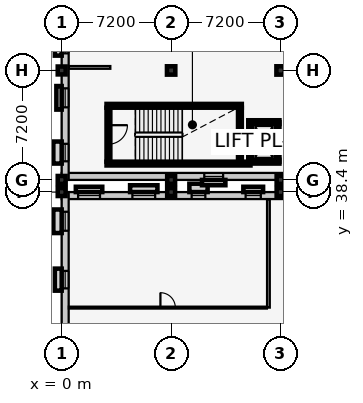
"""IFC4 building model, lengths in metres.
Left out: names, types, materials, properties, quantities, classifications, styles, units other than length and angle.
Written with IfcOpenShell. Run it as: python <this file> out.ifc"""

import sys

from ifc_helpers import new_model, si_unit, direction, frame, frame_2d, origin, origin_2d, place, context, subcontext, project, spatial, rectangle, extrude, element, fill, save


model = new_model("IFC4")
c1 = context("Model", 3, precision=1e-05, world=origin(), true_north=direction((0.0, 1.0)))
c2 = subcontext(c1, "Body", "Model", "MODEL_VIEW")
j1 = project(units=[si_unit("LENGTHUNIT", "METRE"), si_unit("PLANEANGLEUNIT", "RADIAN")], contexts=[c1])
p1 = place(None, origin())
s1 = spatial("IfcSite", under=j1, at=p1, CompositionType="ELEMENT")
p2 = place(p1, origin())
s2 = spatial("IfcBuilding", under=s1, at=p2, CompositionType="ELEMENT")
p3 = place(p2, frame((0.0, 0.0, 5.4)))
s3 = spatial("IfcBuildingStorey", under=s2, at=p3, CompositionType="ELEMENT", Elevation=5.4)
for number, where, z_axis, x_axis in (
    (1, (0.0, 38.4, 0.0), (0.0, 0.0, 1.0), (1.0, 0.0, 0.0)),
    (2, (7.2, 38.4, 0.0), (0.0, 0.0, 1.0), (1.0, 0.0, 0.0)),
    (3, (14.4, 38.4, 0.0), (0.0, 0.0, 1.0), (1.0, 0.0, 0.0)),
    (4, (0.0, 39.2, 0.0), (0.0, 0.0, 1.0), (1.0, 0.0, 0.0)),
    (5, (0.0, 46.4, 0.0), (0.0, 0.0, 1.0), (1.0, 0.0, 0.0)),
    (6, (7.2, 39.2, 0.0), (0.0, 0.0, 1.0), (1.0, 0.0, 0.0)),
):
    element("IfcColumn", number, at=place(p3, frame(where, z_axis=z_axis, x_axis=x_axis)), inside=s3, PredefinedType="COLUMN", context=c2, shape_type="SweptSolid", body=[
        extrude(rectangle(XDim=0.52, YDim=0.52, at=origin_2d()), origin(), (0.0, 0.0, 1.0), 4.2),
    ])
p4 = place(p3, frame((7.2, 46.4, 0.0), z_axis=(0.0, 0.0, 1.0), x_axis=(1.0, 0.0, 0.0)))
e7 = element("IfcColumn", 7, at=p4, inside=s3, PredefinedType="COLUMN", context=c2, shape_type="SweptSolid", body=[
    extrude(rectangle(XDim=0.55, YDim=0.55, at=origin_2d()), origin(), (0.0, 0.0, 1.0), 4.2),
])
p5 = place(p3, frame((14.4, 39.2, 0.0), z_axis=(0.0, 0.0, 1.0), x_axis=(1.0, 0.0, 0.0)))
e8 = element("IfcColumn", 8, at=p5, inside=s3, PredefinedType="COLUMN", context=c2, shape_type="SweptSolid", body=[
    extrude(rectangle(XDim=0.52, YDim=0.52, at=origin_2d()), origin(), (0.0, 0.0, 1.0), 4.2),
])
p6 = place(p3, frame((14.4, 46.4, 0.0), z_axis=(0.0, 0.0, 1.0), x_axis=(1.0, 0.0, 0.0)))
e9 = element("IfcColumn", 9, at=p6, inside=s3, PredefinedType="COLUMN", context=c2, shape_type="SweptSolid", body=[
    extrude(rectangle(XDim=0.55, YDim=0.55, at=origin_2d()), origin(), (0.0, 0.0, 1.0), 4.2),
])
p7 = place(p3, frame((0.0, 38.17, 0.0), z_axis=(0.0, 0.0, 1.0), x_axis=(1.0, 0.0, 0.0)))
e10 = element("IfcWall", 10, at=p7, inside=s3, PredefinedType="SOLIDWALL", context=c2, shape_type="SweptSolid", body=[
    extrude(rectangle(XDim=57.6, YDim=0.46, at=frame_2d((28.8, 0.0))), origin(), (0.0, 0.0, 1.0), 3.215),
])
p8 = place(p7, frame((1.08, 0.0, 0.9)))
e11 = element("IfcOpeningElement", 11, at=p8, cuts=e10, PredefinedType="OPENING", context=c2, shape_type="SweptSolid", body=[
    extrude(rectangle(XDim=1.44, YDim=1.75, at=frame_2d((0.72, 0.875))), frame((0.0, 0.242, 0.0), z_axis=(0.0, -1.0, 0.0), x_axis=(1.0, 0.0, 0.0)), (0.0, 0.0, 1.0), 0.484),
])
p9 = place(p7, frame((4.65, 0.0, 0.9)))
e12 = element("IfcOpeningElement", 12, at=p9, cuts=e10, PredefinedType="OPENING", context=c2, shape_type="SweptSolid", body=[
    extrude(rectangle(XDim=1.5, YDim=1.75, at=frame_2d((0.75, 0.875))), frame((0.0, 0.242, 0.0), z_axis=(0.0, -1.0, 0.0), x_axis=(1.0, 0.0, 0.0)), (0.0, 0.0, 1.0), 0.484),
])
p10 = place(p7, frame((8.55, 0.0, 0.9)))
e13 = element("IfcOpeningElement", 13, at=p10, cuts=e10, PredefinedType="OPENING", context=c2, shape_type="SweptSolid", body=[
    extrude(rectangle(XDim=0.9, YDim=1.35, at=frame_2d((0.45, 0.675))), frame((0.0, 0.242, 0.0), z_axis=(0.0, -1.0, 0.0), x_axis=(1.0, 0.0, 0.0)), (0.0, 0.0, 1.0), 0.484),
])
p11 = place(p7, frame((12.1, 0.0, 0.9)))
e14 = element("IfcOpeningElement", 14, at=p11, cuts=e10, PredefinedType="OPENING", context=c2, shape_type="SweptSolid", body=[
    extrude(rectangle(XDim=1.0, YDim=1.35, at=frame_2d((0.5, 0.675))), frame((0.0, 0.242, 0.0), z_axis=(0.0, -1.0, 0.0), x_axis=(1.0, 0.0, 0.0)), (0.0, 0.0, 1.0), 0.484),
])
p12 = place(p7, frame((15.65, 0.0, 0.9)))
e15 = element("IfcOpeningElement", 15, at=p12, cuts=e10, PredefinedType="OPENING", context=c2, shape_type="SweptSolid", body=[
    extrude(rectangle(XDim=1.1, YDim=1.35, at=frame_2d((0.55, 0.675))), frame((0.0, 0.242, 0.0), z_axis=(0.0, -1.0, 0.0), x_axis=(1.0, 0.0, 0.0)), (0.0, 0.0, 1.0), 0.484),
])
p13 = place(p7, frame((19.2, 0.0, 0.9)))
e16 = element("IfcOpeningElement", 16, at=p13, cuts=e10, PredefinedType="OPENING", context=c2, shape_type="SweptSolid", body=[
    extrude(rectangle(XDim=1.2, YDim=1.35, at=frame_2d((0.6, 0.675))), frame((0.0, 0.242, 0.0), z_axis=(0.0, -1.0, 0.0), x_axis=(1.0, 0.0, 0.0)), (0.0, 0.0, 1.0), 0.484),
])
p14 = place(p7, frame((22.75, 0.0, 0.9)))
e17 = element("IfcOpeningElement", 17, at=p14, cuts=e10, PredefinedType="OPENING", context=c2, shape_type="SweptSolid", body=[
    extrude(rectangle(XDim=1.3, YDim=1.35, at=frame_2d((0.65, 0.675))), frame((0.0, 0.242, 0.0), z_axis=(0.0, -1.0, 0.0), x_axis=(1.0, 0.0, 0.0)), (0.0, 0.0, 1.0), 0.484),
])
p15 = place(p7, frame((30.125, 0.0, 0.9)))
e18 = element("IfcOpeningElement", 18, at=p15, cuts=e10, PredefinedType="OPENING", context=c2, shape_type="SweptSolid", body=[
    extrude(rectangle(XDim=0.95, YDim=1.45, at=frame_2d((0.475, 0.725))), frame((0.0, 0.242, 0.0), z_axis=(0.0, -1.0, 0.0), x_axis=(1.0, 0.0, 0.0)), (0.0, 0.0, 1.0), 0.484),
])
p16 = place(p7, frame((33.675, 0.0, 0.9)))
e19 = element("IfcOpeningElement", 19, at=p16, cuts=e10, PredefinedType="OPENING", context=c2, shape_type="SweptSolid", body=[
    extrude(rectangle(XDim=1.05, YDim=1.45, at=frame_2d((0.525, 0.725))), frame((0.0, 0.242, 0.0), z_axis=(0.0, -1.0, 0.0), x_axis=(1.0, 0.0, 0.0)), (0.0, 0.0, 1.0), 0.484),
])
p17 = place(p7, frame((40.775, 0.0, 0.9)))
e20 = element("IfcOpeningElement", 20, at=p17, cuts=e10, PredefinedType="OPENING", context=c2, shape_type="SweptSolid", body=[
    extrude(rectangle(XDim=1.25, YDim=1.45, at=frame_2d((0.625, 0.725))), frame((0.0, 0.242, 0.0), z_axis=(0.0, -1.0, 0.0), x_axis=(1.0, 0.0, 0.0)), (0.0, 0.0, 1.0), 0.484),
])
p18 = place(p7, frame((44.325, 0.0, 0.9)))
e21 = element("IfcOpeningElement", 21, at=p18, cuts=e10, PredefinedType="OPENING", context=c2, shape_type="SweptSolid", body=[
    extrude(rectangle(XDim=1.35, YDim=1.45, at=frame_2d((0.675, 0.725))), frame((0.0, 0.242, 0.0), z_axis=(0.0, -1.0, 0.0), x_axis=(1.0, 0.0, 0.0)), (0.0, 0.0, 1.0), 0.484),
])
p19 = place(p7, frame((51.75, 0.0, 0.9)))
e22 = element("IfcOpeningElement", 22, at=p19, cuts=e10, PredefinedType="OPENING", context=c2, shape_type="SweptSolid", body=[
    extrude(rectangle(XDim=0.9, YDim=1.6, at=frame_2d((0.45, 0.8))), frame((0.0, 0.242, 0.0), z_axis=(0.0, -1.0, 0.0), x_axis=(1.0, 0.0, 0.0)), (0.0, 0.0, 1.0), 0.484),
])
p20 = place(p7, frame((55.275, 0.0, 0.9)))
e23 = element("IfcOpeningElement", 23, at=p20, cuts=e10, PredefinedType="OPENING", context=c2, shape_type="SweptSolid", body=[
    extrude(rectangle(XDim=1.05, YDim=1.6, at=frame_2d((0.525, 0.8))), frame((0.0, 0.242, 0.0), z_axis=(0.0, -1.0, 0.0), x_axis=(1.0, 0.0, 0.0)), (0.0, 0.0, 1.0), 0.484),
])
p21 = place(p3, frame((0.23, 0.0, 0.0), z_axis=(0.0, 0.0, 1.0), x_axis=(0.0, 1.0, 0.0)))
e24 = element("IfcWall", 24, at=p21, inside=s3, PredefinedType="SOLIDWALL", context=c2, shape_type="SweptSolid", body=[
    extrude(rectangle(XDim=38.4, YDim=0.46, at=frame_2d((19.2, 0.0))), origin(), (0.0, 0.0, 1.0), 3.075),
])
p22 = place(p21, frame((32.065, 0.0, 0.9)))
e25 = element("IfcOpeningElement", 25, at=p22, cuts=e24, PredefinedType="OPENING", context=c2, shape_type="SweptSolid", body=[
    extrude(rectangle(XDim=1.15, YDim=1.6, at=frame_2d((0.575, 0.8))), frame((0.0, 0.242, 0.0), z_axis=(0.0, -1.0, 0.0), x_axis=(1.0, 0.0, 0.0)), (0.0, 0.0, 1.0), 0.484),
])
p23 = place(p21, frame((35.855, 0.0, 0.9)))
e26 = element("IfcOpeningElement", 26, at=p23, cuts=e24, PredefinedType="OPENING", context=c2, shape_type="SweptSolid", body=[
    extrude(rectangle(XDim=1.25, YDim=1.6, at=frame_2d((0.625, 0.8))), frame((0.0, 0.242, 0.0), z_axis=(0.0, -1.0, 0.0), x_axis=(1.0, 0.0, 0.0)), (0.0, 0.0, 1.0), 0.484),
])
p24 = place(p3, frame((36.0, 39.43, 0.0), z_axis=(0.0, 0.0, 1.0), x_axis=(-1.0, 0.0, 0.0)))
e27 = element("IfcWall", 27, at=p24, inside=s3, PredefinedType="SOLIDWALL", context=c2, shape_type="SweptSolid", body=[
    extrude(rectangle(XDim=36.0, YDim=0.46, at=frame_2d((18.0, 0.0))), origin(), (0.0, 0.0, 1.0), 3.235),
])
p25 = place(p24, frame((1.425, 0.0, 0.9)))
e28 = element("IfcOpeningElement", 28, at=p25, cuts=e27, PredefinedType="OPENING", context=c2, shape_type="SweptSolid", body=[
    extrude(rectangle(XDim=1.15, YDim=1.6, at=frame_2d((0.575, 0.8))), frame((0.0, 0.242, 0.0), z_axis=(0.0, -1.0, 0.0), x_axis=(1.0, 0.0, 0.0)), (0.0, 0.0, 1.0), 0.484),
])
p26 = place(p24, frame((25.38, 0.0, 0.9)))
e29 = element("IfcOpeningElement", 29, at=p26, cuts=e27, PredefinedType="OPENING", context=c2, shape_type="SweptSolid", body=[
    extrude(rectangle(XDim=1.24, YDim=1.75, at=frame_2d((0.62, 0.875))), frame((0.0, 0.242, 0.0), z_axis=(0.0, -1.0, 0.0), x_axis=(1.0, 0.0, 0.0)), (0.0, 0.0, 1.0), 0.484),
])
p27 = place(p3, frame((0.23, 39.2, 0.0), z_axis=(0.0, 0.0, 1.0), x_axis=(0.0, 1.0, 0.0)))
e30 = element("IfcWall", 30, at=p27, inside=s3, PredefinedType="SOLIDWALL", context=c2, shape_type="SweptSolid", body=[
    extrude(rectangle(XDim=28.8, YDim=0.46, at=frame_2d((14.4, 0.0))), origin(), (0.0, 0.0, 1.0), 3.195),
])
p28 = place(p27, frame((1.225, 0.0, 0.9)))
e31 = element("IfcOpeningElement", 31, at=p28, cuts=e30, PredefinedType="OPENING", context=c2, shape_type="SweptSolid", body=[
    extrude(rectangle(XDim=1.15, YDim=1.45, at=frame_2d((0.575, 0.725))), frame((0.0, 0.242, 0.0), z_axis=(0.0, -1.0, 0.0), x_axis=(1.0, 0.0, 0.0)), (0.0, 0.0, 1.0), 0.484),
])
p29 = place(p27, frame((4.775, 0.0, 0.9)))
e32 = element("IfcOpeningElement", 32, at=p29, cuts=e30, PredefinedType="OPENING", context=c2, shape_type="SweptSolid", body=[
    extrude(rectangle(XDim=1.25, YDim=1.45, at=frame_2d((0.625, 0.725))), frame((0.0, 0.242, 0.0), z_axis=(0.0, -1.0, 0.0), x_axis=(1.0, 0.0, 0.0)), (0.0, 0.0, 1.0), 0.484),
])
p30 = place(p27, frame((8.325, 0.0, 0.9)))
e33 = element("IfcOpeningElement", 33, at=p30, cuts=e30, PredefinedType="OPENING", context=c2, shape_type="SweptSolid", body=[
    extrude(rectangle(XDim=1.35, YDim=1.45, at=frame_2d((0.675, 0.725))), frame((0.0, 0.242, 0.0), z_axis=(0.0, -1.0, 0.0), x_axis=(1.0, 0.0, 0.0)), (0.0, 0.0, 1.0), 0.484),
])
p31 = place(p27, frame((11.875, 0.0, 0.9)))
e34 = element("IfcOpeningElement", 34, at=p31, cuts=e30, PredefinedType="OPENING", context=c2, shape_type="SweptSolid", body=[
    extrude(rectangle(XDim=1.45, YDim=1.45, at=frame_2d((0.725, 0.725))), frame((0.0, 0.242, 0.0), z_axis=(0.0, -1.0, 0.0), x_axis=(1.0, 0.0, 0.0)), (0.0, 0.0, 1.0), 0.484),
])
p32 = place(p27, frame((15.75, 0.0, 0.9)))
e35 = element("IfcOpeningElement", 35, at=p32, cuts=e30, PredefinedType="OPENING", context=c2, shape_type="SweptSolid", body=[
    extrude(rectangle(XDim=0.9, YDim=1.6, at=frame_2d((0.45, 0.8))), frame((0.0, 0.242, 0.0), z_axis=(0.0, -1.0, 0.0), x_axis=(1.0, 0.0, 0.0)), (0.0, 0.0, 1.0), 0.484),
])
p33 = place(p27, frame((19.275, 0.0, 0.9)))
e36 = element("IfcOpeningElement", 36, at=p33, cuts=e30, PredefinedType="OPENING", context=c2, shape_type="SweptSolid", body=[
    extrude(rectangle(XDim=1.05, YDim=1.6, at=frame_2d((0.525, 0.8))), frame((0.0, 0.242, 0.0), z_axis=(0.0, -1.0, 0.0), x_axis=(1.0, 0.0, 0.0)), (0.0, 0.0, 1.0), 0.484),
])
p34 = place(p27, frame((22.825, 0.0, 0.9)))
e37 = element("IfcOpeningElement", 37, at=p34, cuts=e30, PredefinedType="OPENING", context=c2, shape_type="SweptSolid", body=[
    extrude(rectangle(XDim=1.15, YDim=1.6, at=frame_2d((0.575, 0.8))), frame((0.0, 0.242, 0.0), z_axis=(0.0, -1.0, 0.0), x_axis=(1.0, 0.0, 0.0)), (0.0, 0.0, 1.0), 0.484),
])
p35 = place(p27, frame((26.375, 0.0, 0.9)))
e38 = element("IfcOpeningElement", 38, at=p35, cuts=e30, PredefinedType="OPENING", context=c2, shape_type="SweptSolid", body=[
    extrude(rectangle(XDim=1.25, YDim=1.6, at=frame_2d((0.625, 0.8))), frame((0.0, 0.242, 0.0), z_axis=(0.0, -1.0, 0.0), x_axis=(1.0, 0.0, 0.0)), (0.0, 0.0, 1.0), 0.484),
])
p36 = place(p3, frame((2.95, 40.275, 0.0), z_axis=(0.0, 0.0, 1.0), x_axis=(1.0, 0.0, 0.0)))
e39 = element("IfcWall", 39, at=p36, inside=s3, PredefinedType="SHEAR", context=c2, shape_type="SweptSolid", body=[
    extrude(rectangle(XDim=9.47, YDim=0.25, at=frame_2d((4.735, 0.0))), origin(), (0.0, 0.0, 1.0), 3.94),
])
p37 = place(p3, frame((11.85, 44.075, 0.0), z_axis=(0.0, 0.0, 1.0), x_axis=(-1.0, 0.0, 0.0)))
e40 = element("IfcWall", 40, at=p37, inside=s3, PredefinedType="SHEAR", context=c2, shape_type="SweptSolid", body=[
    extrude(rectangle(XDim=8.9, YDim=0.25, at=frame_2d((4.45, 0.0))), origin(), (0.0, 0.0, 1.0), 3.94),
])
p38 = place(p3, frame((3.075, 43.95, 0.0), z_axis=(0.0, 0.0, 1.0), x_axis=(0.0, -1.0, 0.0)))
e41 = element("IfcWall", 41, at=p38, inside=s3, PredefinedType="SHEAR", context=c2, shape_type="SweptSolid", body=[
    extrude(rectangle(XDim=3.55, YDim=0.25, at=frame_2d((1.775, 0.0))), origin(), (0.0, 0.0, 1.0), 3.94),
])
p39 = place(p38, frame((1.15, 0.0, 0.0)))
e42 = element("IfcOpeningElement", 42, at=p39, cuts=e41, PredefinedType="OPENING", context=c2, shape_type="SweptSolid", body=[
    extrude(rectangle(XDim=1.25, YDim=2.15, at=frame_2d((0.625, 1.075))), frame((0.0, 0.137, 0.0), z_axis=(0.0, -1.0, 0.0), x_axis=(1.0, 0.0, 0.0)), (0.0, 0.0, 1.0), 0.274),
])
p40 = place(p3, frame((11.725, 40.4, 0.0), z_axis=(0.0, 0.0, 1.0), x_axis=(0.0, 1.0, 0.0)))
e43 = element("IfcWall", 43, at=p40, inside=s3, PredefinedType="SHEAR", context=c2, shape_type="SweptSolid", body=[
    extrude(rectangle(XDim=3.55, YDim=0.25, at=frame_2d((1.775, 0.0))), origin(), (0.0, 0.0, 1.0), 3.94),
])
p41 = place(p3, frame((12.275, 40.4, 0.0), z_axis=(0.0, 0.0, 1.0), x_axis=(1.0, 0.0, 0.0)))
e44 = element("IfcWall", 44, at=p41, inside=s3, PredefinedType="SHEAR", context=c2, shape_type="SweptSolid", body=[
    extrude(rectangle(XDim=2.05, YDim=0.25, at=frame_2d((1.025, 0.0))), origin(), (0.0, 0.0, 1.0), 3.94),
])
p42 = place(p3, frame((14.325, 43.0, 0.0), z_axis=(0.0, 0.0, 1.0), x_axis=(-1.0, 0.0, 0.0)))
e45 = element("IfcWall", 45, at=p42, inside=s3, PredefinedType="SHEAR", context=c2, shape_type="SweptSolid", body=[
    extrude(rectangle(XDim=2.05, YDim=0.25, at=frame_2d((1.025, 0.0))), origin(), (0.0, 0.0, 1.0), 3.94),
])
p43 = place(p42, frame((0.55, 0.0, 0.0)))
e46 = element("IfcOpeningElement", 46, at=p43, cuts=e45, PredefinedType="OPENING", context=c2, shape_type="SweptSolid", body=[
    extrude(rectangle(XDim=0.95, YDim=2.1, at=frame_2d((0.475, 1.05))), frame((0.0, 0.137, 0.0), z_axis=(0.0, -1.0, 0.0), x_axis=(1.0, 0.0, 0.0)), (0.0, 0.0, 1.0), 0.274),
])
for number, where, z_axis, x_axis in (
    (47, (12.4, 43.0, 0.0), (0.0, 0.0, 1.0), (0.0, -1.0, 0.0)),
    (48, (14.2, 40.4, 0.0), (0.0, 0.0, 1.0), (0.0, 1.0, 0.0)),
):
    element("IfcWall", number, at=place(p3, frame(where, z_axis=z_axis, x_axis=x_axis)), inside=s3, PredefinedType="SHEAR", context=c2, shape_type="SweptSolid", body=[
        extrude(rectangle(XDim=2.6, YDim=0.25, at=frame_2d((1.3, 0.0))), origin(), (0.0, 0.0, 1.0), 3.94),
    ])
p44 = place(p3, frame((13.6, 30.8, 0.0), z_axis=(0.0, 0.0, 1.0), x_axis=(0.0, 1.0, 0.0)))
e49 = element("IfcWall", 49, at=p44, inside=s3, PredefinedType="PARTITIONING", context=c2, shape_type="SweptSolid", body=[
    extrude(rectangle(XDim=7.13, YDim=0.18, at=frame_2d((3.565, 0.0))), origin(), (0.0, 0.0, 1.0), 3.92),
])
p45 = place(p3, frame((0.47, 30.8, 0.0), z_axis=(0.0, 0.0, 1.0), x_axis=(1.0, 0.0, 0.0)))
e50 = element("IfcWall", 50, at=p45, inside=s3, PredefinedType="PARTITIONING", context=c2, shape_type="SweptSolid", body=[
    extrude(rectangle(XDim=13.03, YDim=0.125, at=frame_2d((6.515, 0.0))), origin(), (0.0, 0.0, 1.0), 3.92),
])
p46 = place(p45, frame((6.025, 0.0, 0.0)))
e51 = element("IfcOpeningElement", 51, at=p46, cuts=e50, PredefinedType="OPENING", context=c2, shape_type="SweptSolid", body=[
    extrude(rectangle(XDim=0.98, YDim=2.12, at=frame_2d((0.49, 1.06))), frame((0.0, 0.074, 0.0), z_axis=(0.0, -1.0, 0.0), x_axis=(1.0, 0.0, 0.0)), (0.0, 0.0, 1.0), 0.149),
])
p47 = place(p3, frame((0.47, 46.6, 0.0), z_axis=(0.0, 0.0, 1.0), x_axis=(1.0, 0.0, 0.0)))
e52 = element("IfcWall", 52, at=p47, inside=s3, PredefinedType="PARTITIONING", context=c2, shape_type="SweptSolid", body=[
    extrude(rectangle(XDim=2.73, YDim=0.18, at=frame_2d((1.365, 0.0))), origin(), (0.0, 0.0, 1.0), 3.265),
])
p48 = place(p8, origin())
e53 = element("IfcWindow", 53, at=p48, inside=s3, PartitioningType="SINGLE_PANEL", PredefinedType="WINDOW", context=c2, shape_type="SweptSolid", body=[
    extrude(rectangle(XDim=1.44, YDim=1.75, at=frame_2d((0.72, 0.875))), frame((0.0, 0.03, 0.0), z_axis=(0.0, -1.0, 0.0), x_axis=(1.0, 0.0, 0.0)), (0.0, 0.0, 1.0), 0.06),
])
fill(e11, e53)
p49 = place(p9, origin())
e54 = element("IfcWindow", 54, at=p49, inside=s3, PartitioningType="SINGLE_PANEL", PredefinedType="WINDOW", context=c2, shape_type="SweptSolid", body=[
    extrude(rectangle(XDim=1.5, YDim=1.75, at=frame_2d((0.75, 0.875))), frame((0.0, 0.03, 0.0), z_axis=(0.0, -1.0, 0.0), x_axis=(1.0, 0.0, 0.0)), (0.0, 0.0, 1.0), 0.06),
])
fill(e12, e54)
p50 = place(p10, origin())
e55 = element("IfcWindow", 55, at=p50, inside=s3, PartitioningType="SINGLE_PANEL", PredefinedType="WINDOW", context=c2, shape_type="SweptSolid", body=[
    extrude(rectangle(XDim=0.9, YDim=1.35, at=frame_2d((0.45, 0.675))), frame((0.0, 0.03, 0.0), z_axis=(0.0, -1.0, 0.0), x_axis=(1.0, 0.0, 0.0)), (0.0, 0.0, 1.0), 0.06),
])
fill(e13, e55)
p51 = place(p11, origin())
e56 = element("IfcWindow", 56, at=p51, inside=s3, PartitioningType="SINGLE_PANEL", PredefinedType="WINDOW", context=c2, shape_type="SweptSolid", body=[
    extrude(rectangle(XDim=1.0, YDim=1.35, at=frame_2d((0.5, 0.675))), frame((0.0, 0.03, 0.0), z_axis=(0.0, -1.0, 0.0), x_axis=(1.0, 0.0, 0.0)), (0.0, 0.0, 1.0), 0.06),
])
fill(e14, e56)
p52 = place(p22, origin())
e57 = element("IfcWindow", 57, at=p52, inside=s3, PartitioningType="SINGLE_PANEL", PredefinedType="WINDOW", context=c2, shape_type="SweptSolid", body=[
    extrude(rectangle(XDim=1.15, YDim=1.6, at=frame_2d((0.575, 0.8))), frame((0.0, 0.03, 0.0), z_axis=(0.0, -1.0, 0.0), x_axis=(1.0, 0.0, 0.0)), (0.0, 0.0, 1.0), 0.06),
])
fill(e25, e57)
p53 = place(p23, origin())
e58 = element("IfcWindow", 58, at=p53, inside=s3, PartitioningType="SINGLE_PANEL", PredefinedType="WINDOW", context=c2, shape_type="SweptSolid", body=[
    extrude(rectangle(XDim=1.25, YDim=1.6, at=frame_2d((0.625, 0.8))), frame((0.0, 0.03, 0.0), z_axis=(0.0, -1.0, 0.0), x_axis=(1.0, 0.0, 0.0)), (0.0, 0.0, 1.0), 0.06),
])
fill(e26, e58)
p54 = place(p26, origin())
e59 = element("IfcWindow", 59, at=p54, inside=s3, PartitioningType="SINGLE_PANEL", PredefinedType="WINDOW", context=c2, shape_type="SweptSolid", body=[
    extrude(rectangle(XDim=1.24, YDim=1.75, at=frame_2d((0.62, 0.875))), frame((0.0, 0.03, 0.0), z_axis=(0.0, -1.0, 0.0), x_axis=(1.0, 0.0, 0.0)), (0.0, 0.0, 1.0), 0.06),
])
fill(e29, e59)
p55 = place(p28, origin())
e60 = element("IfcWindow", 60, at=p55, inside=s3, PartitioningType="SINGLE_PANEL", PredefinedType="WINDOW", context=c2, shape_type="SweptSolid", body=[
    extrude(rectangle(XDim=1.15, YDim=1.45, at=frame_2d((0.575, 0.725))), frame((0.0, 0.03, 0.0), z_axis=(0.0, -1.0, 0.0), x_axis=(1.0, 0.0, 0.0)), (0.0, 0.0, 1.0), 0.06),
])
fill(e31, e60)
p56 = place(p29, origin())
e61 = element("IfcWindow", 61, at=p56, inside=s3, PartitioningType="SINGLE_PANEL", PredefinedType="WINDOW", context=c2, shape_type="SweptSolid", body=[
    extrude(rectangle(XDim=1.25, YDim=1.45, at=frame_2d((0.625, 0.725))), frame((0.0, 0.03, 0.0), z_axis=(0.0, -1.0, 0.0), x_axis=(1.0, 0.0, 0.0)), (0.0, 0.0, 1.0), 0.06),
])
fill(e32, e61)
p57 = place(p30, origin())
e62 = element("IfcWindow", 62, at=p57, inside=s3, PartitioningType="SINGLE_PANEL", PredefinedType="WINDOW", context=c2, shape_type="SweptSolid", body=[
    extrude(rectangle(XDim=1.35, YDim=1.45, at=frame_2d((0.675, 0.725))), frame((0.0, 0.03, 0.0), z_axis=(0.0, -1.0, 0.0), x_axis=(1.0, 0.0, 0.0)), (0.0, 0.0, 1.0), 0.06),
])
fill(e33, e62)
p58 = place(p39, origin())
e63 = element("IfcDoor", 63, at=p58, inside=s3, OperationType="SINGLE_SWING_LEFT", PredefinedType="DOOR", context=c2, shape_type="SweptSolid", body=[
    extrude(rectangle(XDim=1.25, YDim=2.15, at=frame_2d((0.625, 1.075))), frame((0.0, 0.025, 0.0), z_axis=(0.0, -1.0, 0.0), x_axis=(1.0, 0.0, 0.0)), (0.0, 0.0, 1.0), 0.05),
])
fill(e42, e63)
p59 = place(p43, origin())
e64 = element("IfcDoor", 64, at=p59, inside=s3, OperationType="SLIDING_TO_LEFT", PredefinedType="DOOR", context=c2, shape_type="SweptSolid", body=[
    extrude(rectangle(XDim=0.95, YDim=2.1, at=frame_2d((0.475, 1.05))), frame((0.0, 0.025, 0.0), z_axis=(0.0, -1.0, 0.0), x_axis=(1.0, 0.0, 0.0)), (0.0, 0.0, 1.0), 0.05),
])
fill(e46, e64)
p60 = place(p46, origin())
e65 = element("IfcDoor", 65, at=p60, inside=s3, OperationType="SINGLE_SWING_LEFT", PredefinedType="DOOR", context=c2, shape_type="SweptSolid", body=[
    extrude(rectangle(XDim=0.98, YDim=2.12, at=frame_2d((0.49, 1.06))), frame((0.0, 0.025, 0.0), z_axis=(0.0, -1.0, 0.0), x_axis=(1.0, 0.0, 0.0)), (0.0, 0.0, 1.0), 0.05),
])
fill(e51, e65)
save(model, sys.argv[1])
